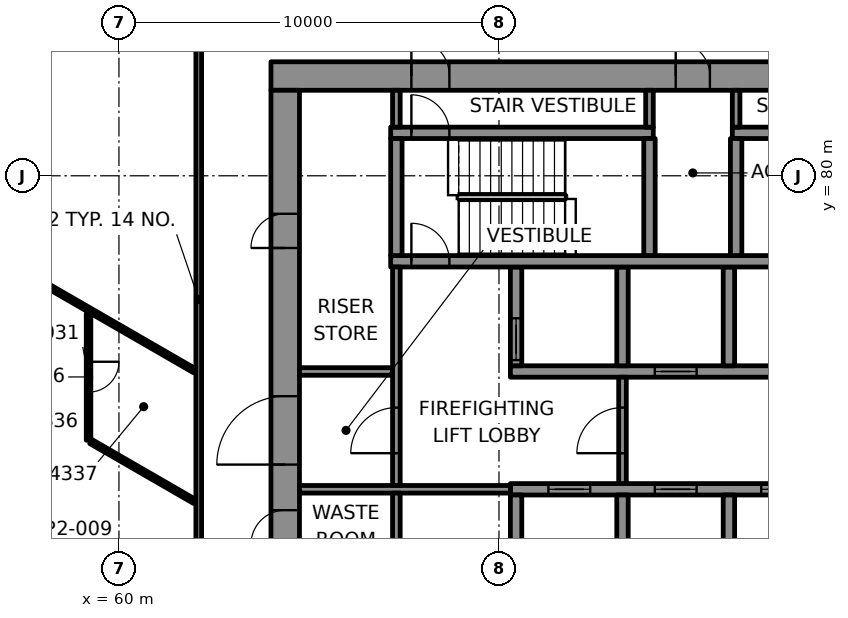
"""IFC4 building model, lengths in metres.
Left out: names, types, materials, properties, quantities, classifications, styles, units other than length and angle.
Written with IfcOpenShell. Run it as: python <this file> out.ifc"""

import sys

from ifc_helpers import new_model, si_unit, direction, frame, frame_2d, origin, place, context, subcontext, project, spatial, rectangle, extrude, element, fill, save


model = new_model("IFC4")
c1 = context("Model", 3, precision=1e-05, world=origin(), true_north=direction((0.0, 1.0)))
c2 = subcontext(c1, "Body", "Model", "MODEL_VIEW")
j1 = project(units=[si_unit("LENGTHUNIT", "METRE"), si_unit("PLANEANGLEUNIT", "RADIAN")], contexts=[c1])
p1 = place(None, origin())
s1 = spatial("IfcSite", under=j1, at=p1, CompositionType="ELEMENT")
p2 = place(p1, origin())
s2 = spatial("IfcBuilding", under=s1, at=p2, CompositionType="ELEMENT")
p3 = place(p2, frame((0.0, 0.0, 187.0)))
s3 = spatial("IfcBuildingStorey", under=s2, at=p3, CompositionType="ELEMENT", Elevation=187.0)
p4 = place(p3, frame((64.0, 82.625, 0.0), z_axis=(0.0, 0.0, 1.0), x_axis=(1.0, 0.0, 0.0)))
e1 = element("IfcWall", 1, at=p4, inside=s3, PredefinedType="SHEAR", context=c2, shape_type="SweptSolid", body=[
    extrude(rectangle(XDim=22.0, YDim=0.75, at=frame_2d((11.0, 0.0))), origin(), (0.0, 0.0, 1.0), 3.7),
])
p5 = place(p4, frame((3.695, 0.0, 0.0)))
e2 = element("IfcOpeningElement", 2, at=p5, cuts=e1, PredefinedType="OPENING", context=c2, shape_type="SweptSolid", body=[
    extrude(rectangle(XDim=1.0, YDim=2.1, at=frame_2d((0.5, 1.05))), frame((0.0, 0.385, 0.0), z_axis=(0.0, -1.0, 0.0), x_axis=(1.0, 0.0, 0.0)), (0.0, 0.0, 1.0), 0.77),
])
p6 = place(p4, frame((17.505, 0.0, 0.0)))
e3 = element("IfcOpeningElement", 3, at=p6, cuts=e1, PredefinedType="OPENING", context=c2, shape_type="SweptSolid", body=[
    extrude(rectangle(XDim=1.0, YDim=2.1, at=frame_2d((0.5, 1.05))), frame((0.0, 0.385, 0.0), z_axis=(0.0, -1.0, 0.0), x_axis=(1.0, 0.0, 0.0)), (0.0, 0.0, 1.0), 0.77),
])
p7 = place(p4, frame((10.65, 0.0, 0.0)))
e4 = element("IfcOpeningElement", 4, at=p7, cuts=e1, PredefinedType="OPENING", context=c2, shape_type="SweptSolid", body=[
    extrude(rectangle(XDim=0.9, YDim=2.1, at=frame_2d((0.45, 1.05))), frame((0.0, 0.385, 0.0), z_axis=(0.0, -1.0, 0.0), x_axis=(1.0, 0.0, 0.0)), (0.0, 0.0, 1.0), 0.77),
])
p8 = place(p3, frame((64.375, 67.75, 0.0), z_axis=(0.0, 0.0, 1.0), x_axis=(0.0, 1.0, 0.0)))
e5 = element("IfcWall", 5, at=p8, inside=s3, PredefinedType="SHEAR", context=c2, shape_type="SweptSolid", body=[
    extrude(rectangle(XDim=14.5, YDim=0.75, at=frame_2d((7.25, 0.0))), origin(), (0.0, 0.0, 1.0), 3.7),
])
p9 = place(p8, frame((4.65, 0.0, 0.0)))
e6 = element("IfcOpeningElement", 6, at=p9, cuts=e5, PredefinedType="OPENING", context=c2, shape_type="SweptSolid", body=[
    extrude(rectangle(XDim=1.8, YDim=2.1, at=frame_2d((0.9, 1.05))), frame((0.0, 0.385, 0.0), z_axis=(0.0, -1.0, 0.0), x_axis=(1.0, 0.0, 0.0)), (0.0, 0.0, 1.0), 0.77),
])
p10 = place(p8, frame((2.55, 0.0, 0.0)))
e7 = element("IfcOpeningElement", 7, at=p10, cuts=e5, PredefinedType="OPENING", context=c2, shape_type="SweptSolid", body=[
    extrude(rectangle(XDim=0.9, YDim=2.1, at=frame_2d((0.45, 1.05))), frame((0.0, 0.385, 0.0), z_axis=(0.0, -1.0, 0.0), x_axis=(1.0, 0.0, 0.0)), (0.0, 0.0, 1.0), 0.77),
])
p11 = place(p8, frame((10.35, 0.0, 0.0)))
e8 = element("IfcOpeningElement", 8, at=p11, cuts=e5, PredefinedType="OPENING", context=c2, shape_type="SweptSolid", body=[
    extrude(rectangle(XDim=0.9, YDim=2.1, at=frame_2d((0.45, 1.05))), frame((0.0, 0.385, 0.0), z_axis=(0.0, -1.0, 0.0), x_axis=(1.0, 0.0, 0.0)), (0.0, 0.0, 1.0), 0.77),
])
p12 = place(p3, frame((70.3, 71.75, 0.0), z_axis=(0.0, 0.0, 1.0), x_axis=(1.0, 0.0, 0.0)))
e9 = element("IfcWall", 9, at=p12, inside=s3, PredefinedType="SHEAR", context=c2, shape_type="SweptSolid", body=[
    extrude(rectangle(XDim=14.3, YDim=0.3, at=frame_2d((7.15, 0.0))), origin(), (0.0, 0.0, 1.0), 3.7),
])
p13 = place(p12, frame((1.0, 0.0, 0.0)))
e10 = element("IfcOpeningElement", 10, at=p13, cuts=e9, PredefinedType="OPENING", context=c2, shape_type="SweptSolid", body=[
    extrude(rectangle(XDim=1.1, YDim=2.1, at=frame_2d((0.55, 1.05))), frame((0.0, 0.16, 0.0), z_axis=(0.0, -1.0, 0.0), x_axis=(1.0, 0.0, 0.0)), (0.0, 0.0, 1.0), 0.32),
])
p14 = place(p12, frame((3.8, 0.0, 0.0)))
e11 = element("IfcOpeningElement", 11, at=p14, cuts=e9, PredefinedType="OPENING", context=c2, shape_type="SweptSolid", body=[
    extrude(rectangle(XDim=1.1, YDim=2.1, at=frame_2d((0.55, 1.05))), frame((0.0, 0.16, 0.0), z_axis=(0.0, -1.0, 0.0), x_axis=(1.0, 0.0, 0.0)), (0.0, 0.0, 1.0), 0.32),
])
p15 = place(p12, frame((6.6, 0.0, 0.0)))
e12 = element("IfcOpeningElement", 12, at=p15, cuts=e9, PredefinedType="OPENING", context=c2, shape_type="SweptSolid", body=[
    extrude(rectangle(XDim=1.1, YDim=2.1, at=frame_2d((0.55, 1.05))), frame((0.0, 0.16, 0.0), z_axis=(0.0, -1.0, 0.0), x_axis=(1.0, 0.0, 0.0)), (0.0, 0.0, 1.0), 0.32),
])
p16 = place(p12, frame((9.4, 0.0, 0.0)))
e13 = element("IfcOpeningElement", 13, at=p16, cuts=e9, PredefinedType="OPENING", context=c2, shape_type="SweptSolid", body=[
    extrude(rectangle(XDim=1.1, YDim=2.1, at=frame_2d((0.55, 1.05))), frame((0.0, 0.16, 0.0), z_axis=(0.0, -1.0, 0.0), x_axis=(1.0, 0.0, 0.0)), (0.0, 0.0, 1.0), 0.32),
])
p17 = place(p12, frame((12.2, 0.0, 0.0)))
e14 = element("IfcOpeningElement", 14, at=p17, cuts=e9, PredefinedType="OPENING", context=c2, shape_type="SweptSolid", body=[
    extrude(rectangle(XDim=1.1, YDim=2.1, at=frame_2d((0.55, 1.05))), frame((0.0, 0.16, 0.0), z_axis=(0.0, -1.0, 0.0), x_axis=(1.0, 0.0, 0.0)), (0.0, 0.0, 1.0), 0.32),
])
p18 = place(p3, frame((70.3, 74.85, 0.0), z_axis=(0.0, 0.0, 1.0), x_axis=(1.0, 0.0, 0.0)))
e15 = element("IfcWall", 15, at=p18, inside=s3, PredefinedType="SHEAR", context=c2, shape_type="SweptSolid", body=[
    extrude(rectangle(XDim=14.3, YDim=0.3, at=frame_2d((7.15, 0.0))), origin(), (0.0, 0.0, 1.0), 3.7),
])
p19 = place(p18, frame((3.8, 0.0, 0.0)))
e16 = element("IfcOpeningElement", 16, at=p19, cuts=e15, PredefinedType="OPENING", context=c2, shape_type="SweptSolid", body=[
    extrude(rectangle(XDim=1.1, YDim=2.1, at=frame_2d((0.55, 1.05))), frame((0.0, 0.16, 0.0), z_axis=(0.0, -1.0, 0.0), x_axis=(1.0, 0.0, 0.0)), (0.0, 0.0, 1.0), 0.32),
])
p20 = place(p18, frame((12.2, 0.0, 0.0)))
e17 = element("IfcOpeningElement", 17, at=p20, cuts=e15, PredefinedType="OPENING", context=c2, shape_type="SweptSolid", body=[
    extrude(rectangle(XDim=1.1, YDim=2.1, at=frame_2d((0.55, 1.05))), frame((0.0, 0.16, 0.0), z_axis=(0.0, -1.0, 0.0), x_axis=(1.0, 0.0, 0.0)), (0.0, 0.0, 1.0), 0.32),
])
p21 = place(p3, frame((70.45, 69.0, 0.0), z_axis=(0.0, 0.0, 1.0), x_axis=(0.0, 1.0, 0.0)))
e18 = element("IfcWall", 18, at=p21, inside=s3, PredefinedType="SHEAR", context=c2, shape_type="SweptSolid", body=[
    extrude(rectangle(XDim=2.6, YDim=0.3, at=frame_2d((1.3, 0.0))), origin(), (0.0, 0.0, 1.0), 3.7),
])
p22 = place(p3, frame((70.45, 75.0, 0.0), z_axis=(0.0, 0.0, 1.0), x_axis=(0.0, 1.0, 0.0)))
e19 = element("IfcWall", 19, at=p22, inside=s3, PredefinedType="SHEAR", context=c2, shape_type="SweptSolid", body=[
    extrude(rectangle(XDim=2.6, YDim=0.3, at=frame_2d((1.3, 0.0))), origin(), (0.0, 0.0, 1.0), 3.7),
])
p23 = place(p22, frame((0.15, 0.0, 0.0)))
e20 = element("IfcOpeningElement", 20, at=p23, cuts=e19, PredefinedType="OPENING", context=c2, shape_type="SweptSolid", body=[
    extrude(rectangle(XDim=1.1, YDim=2.1, at=frame_2d((0.55, 1.05))), frame((0.0, 0.16, 0.0), z_axis=(0.0, -1.0, 0.0), x_axis=(1.0, 0.0, 0.0)), (0.0, 0.0, 1.0), 0.32),
])
for number, where, z_axis, x_axis in (
    (21, (73.25, 69.0, 0.0), (0.0, 0.0, 1.0), (0.0, 1.0, 0.0)),
    (22, (73.25, 75.0, 0.0), (0.0, 0.0, 1.0), (0.0, 1.0, 0.0)),
    (23, (76.05, 69.0, 0.0), (0.0, 0.0, 1.0), (0.0, 1.0, 0.0)),
    (24, (76.05, 75.0, 0.0), (0.0, 0.0, 1.0), (0.0, 1.0, 0.0)),
):
    element("IfcWall", number, at=place(p3, frame(where, z_axis=z_axis, x_axis=x_axis)), inside=s3, PredefinedType="SHEAR", context=c2, shape_type="SweptSolid", body=[
        extrude(rectangle(XDim=2.6, YDim=0.3, at=frame_2d((1.3, 0.0))), origin(), (0.0, 0.0, 1.0), 3.7),
    ])
p24 = place(p3, frame((67.15, 77.75, 0.0), z_axis=(0.0, 0.0, 1.0), x_axis=(1.0, 0.0, 0.0)))
e25 = element("IfcWall", 25, at=p24, inside=s3, PredefinedType="SHEAR", context=c2, shape_type="SweptSolid", body=[
    extrude(rectangle(XDim=17.45, YDim=0.3, at=frame_2d((8.725, 0.0))), origin(), (0.0, 0.0, 1.0), 3.7),
])
p25 = place(p24, frame((0.545, 0.0, 0.0)))
e26 = element("IfcOpeningElement", 26, at=p25, cuts=e25, PredefinedType="OPENING", context=c2, shape_type="SweptSolid", body=[
    extrude(rectangle(XDim=1.0, YDim=2.1, at=frame_2d((0.5, 1.05))), frame((0.0, 0.16, 0.0), z_axis=(0.0, -1.0, 0.0), x_axis=(1.0, 0.0, 0.0)), (0.0, 0.0, 1.0), 0.32),
])
p26 = place(p3, frame((67.15, 81.13, 0.0), z_axis=(0.0, 0.0, 1.0), x_axis=(1.0, 0.0, 0.0)))
e27 = element("IfcWall", 27, at=p26, inside=s3, PredefinedType="SHEAR", context=c2, shape_type="SweptSolid", body=[
    extrude(rectangle(XDim=6.91, YDim=0.3, at=frame_2d((3.455, 0.0))), origin(), (0.0, 0.0, 1.0), 3.7),
])
p27 = place(p26, frame((0.545, 0.0, 0.0)))
e28 = element("IfcOpeningElement", 28, at=p27, cuts=e27, PredefinedType="OPENING", context=c2, shape_type="SweptSolid", body=[
    extrude(rectangle(XDim=1.0, YDim=2.1, at=frame_2d((0.5, 1.05))), frame((0.0, 0.16, 0.0), z_axis=(0.0, -1.0, 0.0), x_axis=(1.0, 0.0, 0.0)), (0.0, 0.0, 1.0), 0.32),
])
p28 = place(p3, frame((76.14, 81.13, 0.0), z_axis=(0.0, 0.0, 1.0), x_axis=(1.0, 0.0, 0.0)))
e29 = element("IfcWall", 29, at=p28, inside=s3, PredefinedType="SHEAR", context=c2, shape_type="SweptSolid", body=[
    extrude(rectangle(XDim=6.86, YDim=0.3, at=frame_2d((3.43, 0.0))), origin(), (0.0, 0.0, 1.0), 3.7),
])
p29 = place(p28, frame((5.365, 0.0, 0.0)))
e30 = element("IfcOpeningElement", 30, at=p29, cuts=e29, PredefinedType="OPENING", context=c2, shape_type="SweptSolid", body=[
    extrude(rectangle(XDim=1.0, YDim=2.1, at=frame_2d((0.5, 1.05))), frame((0.0, 0.16, 0.0), z_axis=(0.0, -1.0, 0.0), x_axis=(1.0, 0.0, 0.0)), (0.0, 0.0, 1.0), 0.32),
])
for number, where, z_axis, x_axis in (
    (31, (67.3, 77.9, 0.0), (0.0, 0.0, 1.0), (0.0, 1.0, 0.0)),
    (32, (73.96, 77.9, 0.0), (0.0, 0.0, 1.0), (0.0, 1.0, 0.0)),
    (33, (76.24, 77.9, 0.0), (0.0, 0.0, 1.0), (0.0, 1.0, 0.0)),
):
    element("IfcWall", number, at=place(p3, frame(where, z_axis=z_axis, x_axis=x_axis)), inside=s3, PredefinedType="SHEAR", context=c2, shape_type="SweptSolid", body=[
        extrude(rectangle(XDim=3.08, YDim=0.3, at=frame_2d((1.54, 0.0))), origin(), (0.0, 0.0, 1.0), 3.7),
    ])
p30 = place(p3, frame((62.1, 68.591, 0.0), z_axis=(0.0, 0.0, 1.0), x_axis=(0.0, 1.0, 0.0)))
e34 = element("IfcWall", 34, at=p30, inside=s3, PredefinedType="PARTITIONING", context=c2, shape_type="SweptSolid", body=[
    extrude(rectangle(XDim=16.308, YDim=0.15, at=frame_2d((8.154, 0.0))), origin(), (0.0, 0.0, 1.0), 3.1),
])
p31 = place(p3, frame((59.2, 76.371, 0.0), z_axis=(0.0, 0.0, 1.0), x_axis=(0.0, -1.0, 0.0)))
e35 = element("IfcWall", 35, at=p31, inside=s3, PredefinedType="PARTITIONING", context=c2, shape_type="SweptSolid", body=[
    extrude(rectangle(XDim=3.329, YDim=0.12, at=frame_2d((1.665, 0.0))), origin(), (0.0, 0.0, 1.0), 3.1),
])
p32 = place(p31, frame((1.265, 0.0, 0.0)))
e36 = element("IfcOpeningElement", 36, at=p32, cuts=e35, PredefinedType="OPENING", context=c2, shape_type="SweptSolid", body=[
    extrude(rectangle(XDim=0.8, YDim=2.1, at=frame_2d((0.4, 1.05))), frame((0.0, 0.07, 0.0), z_axis=(0.0, -1.0, 0.0), x_axis=(1.0, 0.0, 0.0)), (0.0, 0.0, 1.0), 0.14),
])
p33 = place(p3, frame((61.99, 74.869, 0.0), z_axis=(0.0, 0.0, 1.0), x_axis=(-0.866025877972, 0.499999178681, 0.0)))
e37 = element("IfcWall", 37, at=p33, inside=s3, PredefinedType="PARTITIONING", context=c2, shape_type="SweptSolid", body=[
    extrude(rectangle(XDim=8.299, YDim=0.12, at=frame_2d((4.149, 0.0))), origin(), (0.0, 0.0, 1.0), 3.022),
])
p34 = place(p3, frame((61.99, 71.431, 0.0), z_axis=(0.0, 0.0, 1.0), x_axis=(-0.866028267601, 0.499995039691, 0.0)))
e38 = element("IfcWall", 38, at=p34, inside=s3, PredefinedType="PARTITIONING", context=c2, shape_type="SweptSolid", body=[
    extrude(rectangle(XDim=3.153, YDim=0.12, at=frame_2d((1.576, 0.0))), origin(), (0.0, 0.0, 1.0), 3.1),
])
p35 = place(p3, frame((60.737, 67.951, 0.0), z_axis=(0.0, 0.0, 1.0), x_axis=(-0.866024451315, 0.500001649722, 0.0)))
e39 = element("IfcWall", 39, at=p35, inside=s3, PredefinedType="PARTITIONING", context=c2, shape_type="SweptSolid", body=[
    extrude(rectangle(XDim=10.673, YDim=0.2, at=frame_2d((5.336, 0.0))), origin(), (0.0, 0.0, 1.0), 3.022),
])
p36 = place(p3, frame((64.75, 71.75, 0.0), z_axis=(0.0, 0.0, 1.0), x_axis=(1.0, 0.0, 0.0)))
e40 = element("IfcWall", 40, at=p36, inside=s3, PredefinedType="PARTITIONING", context=c2, shape_type="SweptSolid", body=[
    extrude(rectangle(XDim=5.55, YDim=0.2, at=frame_2d((2.775, 0.0))), origin(), (0.0, 0.0, 1.0), 3.7),
])
p37 = place(p3, frame((64.75, 74.85, 0.0), z_axis=(0.0, 0.0, 1.0), x_axis=(1.0, 0.0, 0.0)))
e41 = element("IfcWall", 41, at=p37, inside=s3, PredefinedType="PARTITIONING", context=c2, shape_type="SweptSolid", body=[
    extrude(rectangle(XDim=2.45, YDim=0.2, at=frame_2d((1.225, 0.0))), origin(), (0.0, 0.0, 1.0), 3.7),
])
p38 = place(p3, frame((67.3, 67.75, 0.0), z_axis=(0.0, 0.0, 1.0), x_axis=(0.0, 1.0, 0.0)))
e42 = element("IfcWall", 42, at=p38, inside=s3, PredefinedType="PARTITIONING", context=c2, shape_type="SweptSolid", body=[
    extrude(rectangle(XDim=3.9, YDim=0.2, at=frame_2d((1.95, 0.0))), origin(), (0.0, 0.0, 1.0), 3.7),
])
p39 = place(p3, frame((67.3, 71.85, 0.0), z_axis=(0.0, 0.0, 1.0), x_axis=(0.0, 1.0, 0.0)))
e43 = element("IfcWall", 43, at=p39, inside=s3, PredefinedType="PARTITIONING", context=c2, shape_type="SweptSolid", body=[
    extrude(rectangle(XDim=5.75, YDim=0.2, at=frame_2d((2.875, 0.0))), origin(), (0.0, 0.0, 1.0), 3.7),
])
p40 = place(p39, frame((0.85, 0.0, 0.0)))
e44 = element("IfcOpeningElement", 44, at=p40, cuts=e43, PredefinedType="OPENING", context=c2, shape_type="SweptSolid", body=[
    extrude(rectangle(XDim=1.2, YDim=2.1, at=frame_2d((0.6, 1.05))), frame((0.0, 0.11, 0.0), z_axis=(0.0, -1.0, 0.0), x_axis=(1.0, 0.0, 0.0)), (0.0, 0.0, 1.0), 0.22),
])
p41 = place(p3, frame((67.3, 81.28, 0.0), z_axis=(0.0, 0.0, 1.0), x_axis=(0.0, 1.0, 0.0)))
e45 = element("IfcWall", 45, at=p41, inside=s3, PredefinedType="PARTITIONING", context=c2, shape_type="SweptSolid", body=[
    extrude(rectangle(XDim=0.97, YDim=0.2, at=frame_2d((0.485, 0.0))), origin(), (0.0, 0.0, 1.0), 3.7),
])
p42 = place(p3, frame((73.25, 71.9, 0.0), z_axis=(0.0, 0.0, 1.0), x_axis=(0.0, 1.0, 0.0)))
e46 = element("IfcWall", 46, at=p42, inside=s3, PredefinedType="PARTITIONING", context=c2, shape_type="SweptSolid", body=[
    extrude(rectangle(XDim=2.8, YDim=0.2, at=frame_2d((1.4, 0.0))), origin(), (0.0, 0.0, 1.0), 3.7),
])
p43 = place(p42, frame((0.8, 0.0, 0.0)))
e47 = element("IfcOpeningElement", 47, at=p43, cuts=e46, PredefinedType="OPENING", context=c2, shape_type="SweptSolid", body=[
    extrude(rectangle(XDim=1.2, YDim=2.1, at=frame_2d((0.6, 1.05))), frame((0.0, 0.11, 0.0), z_axis=(0.0, -1.0, 0.0), x_axis=(1.0, 0.0, 0.0)), (0.0, 0.0, 1.0), 0.22),
])
for number, where, z_axis, x_axis in (
    (48, (73.96, 81.28, 0.0), (0.0, 0.0, 1.0), (0.0, 1.0, 0.0)),
    (49, (76.24, 81.28, 0.0), (0.0, 0.0, 1.0), (0.0, 1.0, 0.0)),
):
    element("IfcWall", number, at=place(p3, frame(where, z_axis=z_axis, x_axis=x_axis)), inside=s3, PredefinedType="PARTITIONING", context=c2, shape_type="SweptSolid", body=[
        extrude(rectangle(XDim=0.97, YDim=0.2, at=frame_2d((0.485, 0.0))), origin(), (0.0, 0.0, 1.0), 3.7),
    ])
p44 = place(p32, origin())
e50 = element("IfcDoor", 50, at=p44, inside=s3, OperationType="SINGLE_SWING_LEFT", PredefinedType="DOOR", context=c2, shape_type="SweptSolid", body=[
    extrude(rectangle(XDim=0.8, YDim=2.1, at=frame_2d((0.4, 1.05))), frame((0.0, 0.025, 0.0), z_axis=(0.0, -1.0, 0.0), x_axis=(1.0, 0.0, 0.0)), (0.0, 0.0, 1.0), 0.05),
])
fill(e36, e50)
p45 = place(p13, origin())
e51 = element("IfcDoor", 51, at=p45, inside=s3, OperationType="DOUBLE_DOOR_SLIDING", PredefinedType="DOOR", context=c2, shape_type="SweptSolid", body=[
    extrude(rectangle(XDim=1.1, YDim=2.1, at=frame_2d((0.55, 1.05))), frame((0.0, 0.025, 0.0), z_axis=(0.0, -1.0, 0.0), x_axis=(1.0, 0.0, 0.0)), (0.0, 0.0, 1.0), 0.05),
])
fill(e10, e51)
p46 = place(p14, origin())
e52 = element("IfcDoor", 52, at=p46, inside=s3, OperationType="DOUBLE_DOOR_SLIDING", PredefinedType="DOOR", context=c2, shape_type="SweptSolid", body=[
    extrude(rectangle(XDim=1.1, YDim=2.1, at=frame_2d((0.55, 1.05))), frame((0.0, 0.025, 0.0), z_axis=(0.0, -1.0, 0.0), x_axis=(1.0, 0.0, 0.0)), (0.0, 0.0, 1.0), 0.05),
])
fill(e11, e52)
p47 = place(p15, origin())
e53 = element("IfcDoor", 53, at=p47, inside=s3, OperationType="DOUBLE_DOOR_SLIDING", PredefinedType="DOOR", context=c2, shape_type="SweptSolid", body=[
    extrude(rectangle(XDim=1.1, YDim=2.1, at=frame_2d((0.55, 1.05))), frame((0.0, 0.025, 0.0), z_axis=(0.0, -1.0, 0.0), x_axis=(1.0, 0.0, 0.0)), (0.0, 0.0, 1.0), 0.05),
])
fill(e12, e53)
p48 = place(p23, origin())
e54 = element("IfcDoor", 54, at=p48, inside=s3, OperationType="DOUBLE_DOOR_SLIDING", PredefinedType="DOOR", context=c2, shape_type="SweptSolid", body=[
    extrude(rectangle(XDim=1.1, YDim=2.1, at=frame_2d((0.55, 1.05))), frame((0.0, 0.025, 0.0), z_axis=(0.0, -1.0, 0.0), x_axis=(1.0, 0.0, 0.0)), (0.0, 0.0, 1.0), 0.05),
])
fill(e20, e54)
p49 = place(p19, origin())
e55 = element("IfcDoor", 55, at=p49, inside=s3, OperationType="DOUBLE_DOOR_SLIDING", PredefinedType="DOOR", context=c2, shape_type="SweptSolid", body=[
    extrude(rectangle(XDim=1.1, YDim=2.1, at=frame_2d((0.55, 1.05))), frame((0.0, 0.025, 0.0), z_axis=(0.0, -1.0, 0.0), x_axis=(1.0, 0.0, 0.0)), (0.0, 0.0, 1.0), 0.05),
])
fill(e16, e55)
p50 = place(p25, origin())
e56 = element("IfcDoor", 56, at=p50, inside=s3, OperationType="SINGLE_SWING_LEFT", PredefinedType="DOOR", context=c2, shape_type="SweptSolid", body=[
    extrude(rectangle(XDim=1.0, YDim=2.1, at=frame_2d((0.5, 1.05))), frame((0.0, 0.025, 0.0), z_axis=(0.0, -1.0, 0.0), x_axis=(1.0, 0.0, 0.0)), (0.0, 0.0, 1.0), 0.05),
])
fill(e26, e56)
p51 = place(p27, origin())
e57 = element("IfcDoor", 57, at=p51, inside=s3, OperationType="SINGLE_SWING_RIGHT", PredefinedType="DOOR", context=c2, shape_type="SweptSolid", body=[
    extrude(rectangle(XDim=1.0, YDim=2.1, at=frame_2d((0.5, 1.05))), frame((0.0, 0.025, 0.0), z_axis=(0.0, -1.0, 0.0), x_axis=(1.0, 0.0, 0.0)), (0.0, 0.0, 1.0), 0.05),
])
fill(e28, e57)
p52 = place(p5, origin())
e58 = element("IfcDoor", 58, at=p52, inside=s3, OperationType="SINGLE_SWING_LEFT", PredefinedType="DOOR", context=c2, shape_type="SweptSolid", body=[
    extrude(rectangle(XDim=1.0, YDim=2.1, at=frame_2d((0.5, 1.05))), frame((0.0, 0.095, 0.0), z_axis=(0.0, -1.0, 0.0), x_axis=(1.0, 0.0, 0.0)), (0.0, 0.0, 1.0), 0.19),
])
fill(e2, e58)
p53 = place(p43, origin())
e59 = element("IfcDoor", 59, at=p53, inside=s3, OperationType="SINGLE_SWING_LEFT", PredefinedType="DOOR", context=c2, shape_type="SweptSolid", body=[
    extrude(rectangle(XDim=1.2, YDim=2.1, at=frame_2d((0.6, 1.05))), frame((0.0, 0.025, 0.0), z_axis=(0.0, -1.0, 0.0), x_axis=(1.0, 0.0, 0.0)), (0.0, 0.0, 1.0), 0.05),
])
fill(e47, e59)
p54 = place(p40, origin())
e60 = element("IfcDoor", 60, at=p54, inside=s3, OperationType="SINGLE_SWING_RIGHT", PredefinedType="DOOR", context=c2, shape_type="SweptSolid", body=[
    extrude(rectangle(XDim=1.2, YDim=2.1, at=frame_2d((0.6, 1.05))), frame((0.0, 0.025, 0.0), z_axis=(0.0, -1.0, 0.0), x_axis=(1.0, 0.0, 0.0)), (0.0, 0.0, 1.0), 0.05),
])
fill(e44, e60)
p55 = place(p9, origin())
e61 = element("IfcDoor", 61, at=p55, inside=s3, OperationType="SINGLE_SWING_LEFT", PredefinedType="DOOR", context=c2, shape_type="SweptSolid", body=[
    extrude(rectangle(XDim=1.8, YDim=2.1, at=frame_2d((0.9, 1.05))), frame((0.0, 0.095, 0.0), z_axis=(0.0, -1.0, 0.0), x_axis=(1.0, 0.0, 0.0)), (0.0, 0.0, 1.0), 0.19),
])
fill(e6, e61)
p56 = place(p10, origin())
e62 = element("IfcDoor", 62, at=p56, inside=s3, OperationType="SINGLE_SWING_RIGHT", PredefinedType="DOOR", context=c2, shape_type="SweptSolid", body=[
    extrude(rectangle(XDim=0.9, YDim=2.1, at=frame_2d((0.45, 1.05))), frame((0.0, 0.095, 0.0), z_axis=(0.0, -1.0, 0.0), x_axis=(1.0, 0.0, 0.0)), (0.0, 0.0, 1.0), 0.19),
])
fill(e7, e62)
p57 = place(p11, origin())
e63 = element("IfcDoor", 63, at=p57, inside=s3, OperationType="SINGLE_SWING_RIGHT", PredefinedType="DOOR", context=c2, shape_type="SweptSolid", body=[
    extrude(rectangle(XDim=0.9, YDim=2.1, at=frame_2d((0.45, 1.05))), frame((0.0, 0.095, 0.0), z_axis=(0.0, -1.0, 0.0), x_axis=(1.0, 0.0, 0.0)), (0.0, 0.0, 1.0), 0.19),
])
fill(e8, e63)
p58 = place(p7, origin())
e64 = element("IfcDoor", 64, at=p58, inside=s3, OperationType="SINGLE_SWING_LEFT", PredefinedType="DOOR", context=c2, shape_type="SweptSolid", body=[
    extrude(rectangle(XDim=0.9, YDim=2.1, at=frame_2d((0.45, 1.05))), frame((0.0, 0.095, 0.0), z_axis=(0.0, -1.0, 0.0), x_axis=(1.0, 0.0, 0.0)), (0.0, 0.0, 1.0), 0.19),
])
fill(e4, e64)
save(model, sys.argv[1])
